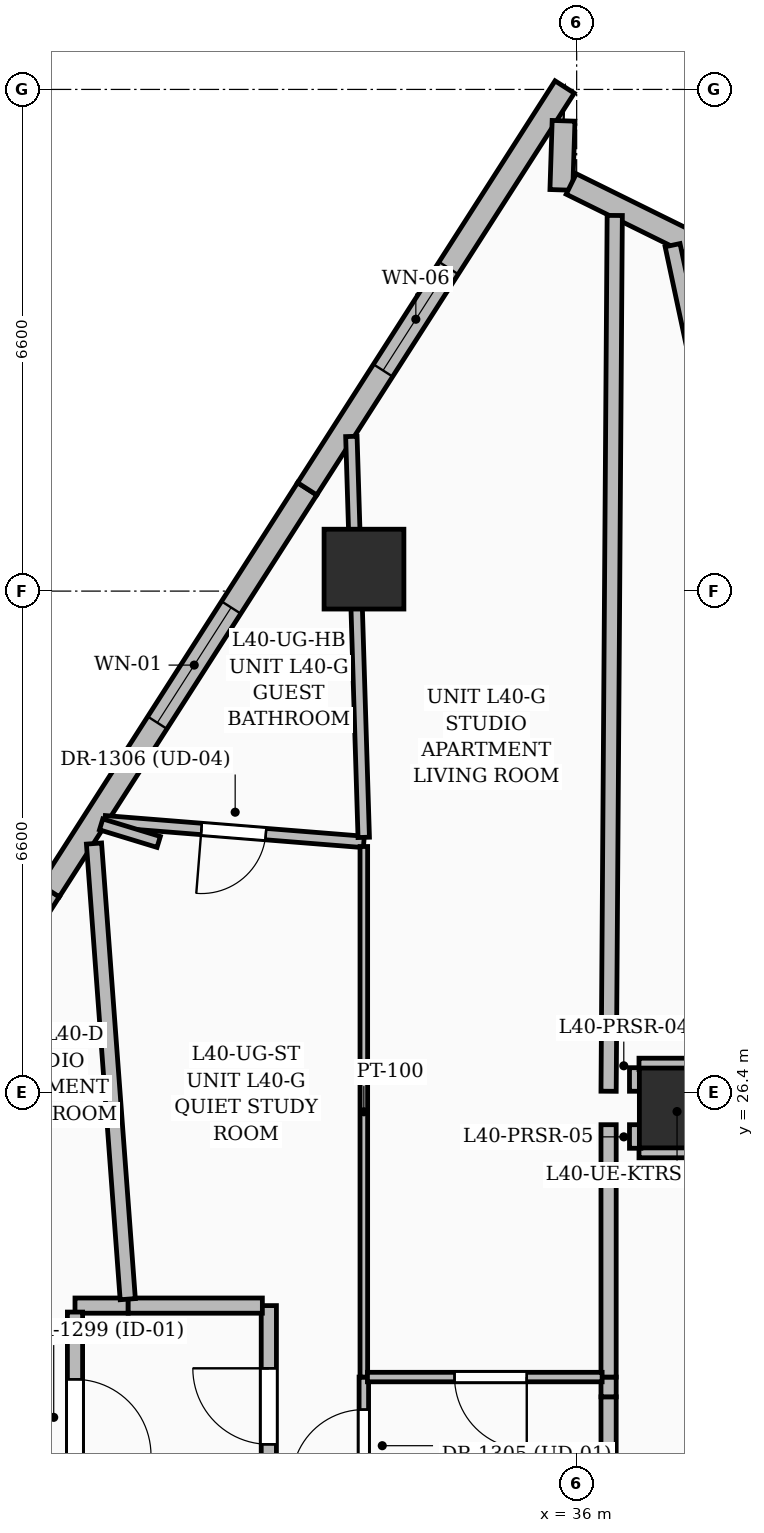
"""IFC4 building model, lengths in metres.
Left out: names, types, materials, properties, quantities, classifications, styles, units other than length and angle.
Written with IfcOpenShell. Run it as: python <this file> out.ifc"""

import sys

from ifc_helpers import new_model, si_unit, direction, frame, frame_2d, origin, origin_2d, place, context, subcontext, project, spatial, rectangle, extrude, element, fill, save


model = new_model("IFC4")
c1 = context("Model", 3, precision=1e-05, world=origin(), true_north=direction((0.0, 1.0)))
c2 = subcontext(c1, "Body", "Model", "MODEL_VIEW")
j1 = project(units=[si_unit("LENGTHUNIT", "METRE"), si_unit("PLANEANGLEUNIT", "RADIAN")], contexts=[c1])
p1 = place(None, origin())
s1 = spatial("IfcSite", under=j1, at=p1, CompositionType="ELEMENT")
p2 = place(p1, origin())
s2 = spatial("IfcBuilding", under=s1, at=p2, CompositionType="ELEMENT")
p3 = place(p2, frame((0.0, 0.0, 157.2)))
s3 = spatial("IfcBuildingStorey", under=s2, at=p3, CompositionType="ELEMENT", Elevation=157.2)
for number, where, z_axis, x_axis in (
    (1, (37.35, 26.2, 0.0), (0.0, 0.0, 1.0), (1.0, 0.0, 0.0)),
    (2, (33.202, 33.289, 0.0), (0.0, 0.0, 1.0), (1.0, 0.0, 0.0)),
):
    element("IfcColumn", number, at=place(p3, frame(where, z_axis=z_axis, x_axis=x_axis)), inside=s3, PredefinedType="COLUMN", context=c2, shape_type="SweptSolid", body=[
        extrude(rectangle(XDim=1.05, YDim=1.05, at=origin_2d()), origin(), (0.0, 0.0, 1.0), 3.6),
    ])
p4 = place(p3, frame((25.679, 23.772, 0.0), z_axis=(0.0, 0.0, 1.0), x_axis=(0.539489448276, 0.841992360535, 0.0)))
e3 = element("IfcWall", 3, at=p4, inside=s3, PredefinedType="SOLIDWALL", context=c2, shape_type="SweptSolid", body=[
    extrude(rectangle(XDim=6.279, YDim=0.3, at=frame_2d((3.14, 0.0))), origin(), (0.0, 0.0, 1.0), 3.35),
])
p5 = place(p4, frame((1.975, 0.0, 0.55)))
e4 = element("IfcOpeningElement", 4, at=p5, cuts=e3, PredefinedType="OPENING", context=c2, shape_type="SweptSolid", body=[
    extrude(rectangle(XDim=2.1, YDim=2.4, at=frame_2d((1.05, 1.2))), frame((0.0, 0.16, 0.0), z_axis=(0.0, -1.0, 0.0), x_axis=(1.0, 0.0, 0.0)), (0.0, 0.0, 1.0), 0.32),
])
p6 = place(p3, frame((29.067, 29.059, 0.0), z_axis=(0.0, 0.0, 1.0), x_axis=(0.539534675603, 0.841963380333, 0.0)))
e5 = element("IfcWall", 5, at=p6, inside=s3, PredefinedType="SOLIDWALL", context=c2, shape_type="SweptSolid", body=[
    extrude(rectangle(XDim=6.279, YDim=0.3, at=frame_2d((3.139, 0.0))), origin(), (0.0, 0.0, 1.0), 3.35),
])
p7 = place(p6, frame((2.625, 0.0, 0.6)))
e6 = element("IfcOpeningElement", 6, at=p7, cuts=e5, PredefinedType="OPENING", context=c2, shape_type="SweptSolid", body=[
    extrude(rectangle(XDim=1.8, YDim=2.1, at=frame_2d((0.9, 1.05))), frame((0.0, 0.16, 0.0), z_axis=(0.0, -1.0, 0.0), x_axis=(1.0, 0.0, 0.0)), (0.0, 0.0, 1.0), 0.32),
])
p8 = place(p3, frame((32.455, 34.345, 0.0), z_axis=(0.0, 0.0, 1.0), x_axis=(0.539489448276, 0.841992360535, 0.0)))
e7 = element("IfcWall", 7, at=p8, inside=s3, PredefinedType="SOLIDWALL", context=c2, shape_type="SweptSolid", body=[
    extrude(rectangle(XDim=6.279, YDim=0.3, at=frame_2d((3.14, 0.0))), origin(), (0.0, 0.0, 1.0), 3.35),
])
p9 = place(p8, frame((1.85, 0.0, 0.55)))
e8 = element("IfcOpeningElement", 8, at=p9, cuts=e7, PredefinedType="OPENING", context=c2, shape_type="SweptSolid", body=[
    extrude(rectangle(XDim=1.6, YDim=2.2, at=frame_2d((0.8, 1.1))), frame((0.0, 0.16, 0.0), z_axis=(0.0, -1.0, 0.0), x_axis=(1.0, 0.0, 0.0)), (0.0, 0.0, 1.0), 0.32),
])
p10 = place(p3, frame((35.828, 39.187, 0.0), z_axis=(0.0, 0.0, 1.0), x_axis=(-0.031938584897, -0.999489833262, 0.0)))
e9 = element("IfcWall", 9, at=p10, inside=s3, PredefinedType="SOLIDWALL", context=c2, shape_type="SweptSolid", body=[
    extrude(rectangle(XDim=0.91, YDim=0.3, at=frame_2d((0.455, 0.0))), origin(), (0.0, 0.0, 1.0), 3.35),
])
p11 = place(p3, frame((35.928, 38.356, 0.0), z_axis=(0.0, 0.0, 1.0), x_axis=(0.896845505116, -0.442343915922, 0.0)))
e10 = element("IfcWall", 10, at=p11, inside=s3, PredefinedType="SOLIDWALL", context=c2, shape_type="SweptSolid", body=[
    extrude(rectangle(XDim=2.249, YDim=0.3, at=frame_2d((1.125, 0.0))), origin(), (0.0, 0.0, 1.0), 3.35),
])
p12 = place(p3, frame((30.1, 23.6, 0.0), z_axis=(0.0, 0.0, 1.0), x_axis=(-1.0, 0.0, 0.0)))
e11 = element("IfcWall", 11, at=p12, inside=s3, PredefinedType="PARTITIONING", context=c2, shape_type="SweptSolid", body=[
    extrude(rectangle(XDim=0.7, YDim=0.2, at=frame_2d((0.35, 0.0))), origin(), (0.0, 0.0, 1.0), 2.393),
])
p13 = place(p3, frame((29.4, 23.515, 0.0), z_axis=(0.0, 0.0, 1.0), x_axis=(0.0, -1.0, 0.0)))
e12 = element("IfcWall", 12, at=p13, inside=s3, PredefinedType="PARTITIONING", context=c2, shape_type="SweptSolid", body=[
    extrude(rectangle(XDim=2.855, YDim=0.2, at=frame_2d((1.427, 0.0))), origin(), (0.0, 0.0, 1.0), 2.393),
])
p14 = place(p13, frame((0.885, 0.0, 0.0)))
e13 = element("IfcOpeningElement", 13, at=p14, cuts=e12, PredefinedType="OPENING", context=c2, shape_type="SweptSolid", body=[
    extrude(rectangle(XDim=1.0, YDim=2.2, at=frame_2d((0.5, 1.1))), frame((0.0, 0.11, 0.0), z_axis=(0.0, -1.0, 0.0), x_axis=(1.0, 0.0, 0.0)), (0.0, 0.0, 1.0), 0.22),
])
p15 = place(p3, frame((31.95, 20.95, 0.0), z_axis=(0.0, 0.0, 1.0), x_axis=(0.0, 1.0, 0.0)))
e14 = element("IfcWall", 14, at=p15, inside=s3, PredefinedType="PARTITIONING", context=c2, shape_type="SweptSolid", body=[
    extrude(rectangle(XDim=2.65, YDim=0.2, at=frame_2d((1.325, 0.0))), origin(), (0.0, 0.0, 1.0), 2.393),
])
p16 = place(p15, frame((0.825, 0.0, 0.0)))
e15 = element("IfcOpeningElement", 15, at=p16, cuts=e14, PredefinedType="OPENING", context=c2, shape_type="SweptSolid", body=[
    extrude(rectangle(XDim=1.0, YDim=2.2, at=frame_2d((0.5, 1.1))), frame((0.0, 0.11, 0.0), z_axis=(0.0, -1.0, 0.0), x_axis=(1.0, 0.0, 0.0)), (0.0, 0.0, 1.0), 0.22),
])
p17 = place(p3, frame((31.865, 23.6, 0.0), z_axis=(0.0, 0.0, 1.0), x_axis=(-1.0, 0.0, 0.0)))
e16 = element("IfcWall", 16, at=p17, inside=s3, PredefinedType="PARTITIONING", context=c2, shape_type="SweptSolid", body=[
    extrude(rectangle(XDim=1.765, YDim=0.2, at=frame_2d((0.882, 0.0))), origin(), (0.0, 0.0, 1.0), 3.01),
])
p18 = place(p3, frame((30.094, 23.685, 0.0), z_axis=(0.0, 0.0, 1.0), x_axis=(-0.073885151141, 0.997266756912, 0.0)))
e17 = element("IfcWall", 17, at=p18, inside=s3, PredefinedType="PARTITIONING", context=c2, shape_type="SweptSolid", body=[
    extrude(rectangle(XDim=6.01, YDim=0.2, at=frame_2d((3.005, 0.0))), origin(), (0.0, 0.0, 1.0), 2.57),
])
p19 = place(p3, frame((36.42, 22.4, 0.0), z_axis=(0.0, 0.0, 1.0), x_axis=(0.0, -1.0, 0.0)))
e18 = element("IfcWall", 18, at=p19, inside=s3, PredefinedType="PARTITIONING", context=c2, shape_type="SweptSolid", body=[
    extrude(rectangle(XDim=4.565, YDim=0.2, at=frame_2d((2.282, 0.0))), origin(), (0.0, 0.0, 1.0), 3.35),
])
p20 = place(p3, frame((36.42, 22.66, 0.0), z_axis=(0.0, 0.0, 1.0), x_axis=(0.0, -1.0, 0.0)))
e19 = element("IfcWall", 19, at=p20, inside=s3, PredefinedType="PARTITIONING", context=c2, shape_type="SweptSolid", body=[
    extrude(rectangle(XDim=0.26, YDim=0.2, at=frame_2d((0.13, 0.0))), origin(), (0.0, 0.0, 1.0), 3.35),
])
p21 = place(p3, frame((36.42, 25.98, 0.0), z_axis=(0.0, 0.0, 1.0), x_axis=(0.0, -1.0, 0.0)))
e20 = element("IfcWall", 20, at=p21, inside=s3, PredefinedType="PARTITIONING", context=c2, shape_type="SweptSolid", body=[
    extrude(rectangle(XDim=3.32, YDim=0.2, at=frame_2d((1.66, 0.0))), origin(), (0.0, 0.0, 1.0), 2.436),
])
p22 = place(p3, frame((36.501, 37.942, 0.0), z_axis=(0.0, 0.0, 1.0), x_axis=(-0.007034618495, -0.999975256765, 0.0)))
e21 = element("IfcWall", 21, at=p22, inside=s3, PredefinedType="PARTITIONING", context=c2, shape_type="SweptSolid", body=[
    extrude(rectangle(XDim=11.522, YDim=0.2, at=frame_2d((5.761, 0.0))), origin(), (0.0, 0.0, 1.0), 2.393),
])
p23 = place(p3, frame((38.83, 30.21, 0.0), z_axis=(0.0, 0.0, 1.0), x_axis=(-0.208896033751, 0.977937854407, 0.0)))
e22 = element("IfcWall", 22, at=p23, inside=s3, PredefinedType="PARTITIONING", context=c2, shape_type="SweptSolid", body=[
    extrude(rectangle(XDim=7.507, YDim=0.2, at=frame_2d((3.753, 0.0))), origin(), (0.0, 0.0, 1.0), 2.57),
])
p24 = place(p3, frame((33.2, 29.7, 0.0), z_axis=(0.0, 0.0, 1.0), x_axis=(-0.996817095408, 0.079722508132, 0.0)))
e23 = element("IfcWall", 23, at=p24, inside=s3, PredefinedType="PARTITIONING", context=c2, shape_type="SweptSolid", body=[
    extrude(rectangle(XDim=3.418, YDim=0.15, at=frame_2d((1.709, 0.0))), origin(), (0.0, 0.0, 1.0), 2.57),
])
p25 = place(p24, frame((1.293, 0.0, 0.0)))
e24 = element("IfcOpeningElement", 24, at=p25, cuts=e23, PredefinedType="OPENING", context=c2, shape_type="SweptSolid", body=[
    extrude(rectangle(XDim=0.85, YDim=2.1, at=frame_2d((0.425, 1.05))), frame((0.0, 0.085, 0.0), z_axis=(0.0, -1.0, 0.0), x_axis=(1.0, 0.0, 0.0)), (0.0, 0.0, 1.0), 0.17),
])
p26 = place(p3, frame((33.2, 20.998, 0.0), z_axis=(0.0, 0.0, 1.0), x_axis=(0.0, 1.0, 0.0)))
e25 = element("IfcWall", 25, at=p26, inside=s3, PredefinedType="PARTITIONING", context=c2, shape_type="SweptSolid", body=[
    extrude(rectangle(XDim=1.662, YDim=0.125, at=frame_2d((0.831, 0.0))), origin(), (0.0, 0.0, 1.0), 3.35),
])
p27 = place(p26, frame((0.284, 0.0, 0.0)))
e26 = element("IfcOpeningElement", 26, at=p27, cuts=e25, PredefinedType="OPENING", context=c2, shape_type="SweptSolid", body=[
    extrude(rectangle(XDim=0.95, YDim=2.2, at=frame_2d((0.475, 1.1))), frame((0.0, 0.072, 0.0), z_axis=(0.0, -1.0, 0.0), x_axis=(1.0, 0.0, 0.0)), (0.0, 0.0, 1.0), 0.145),
])
p28 = place(p3, frame((33.2, 22.66, 0.0), z_axis=(0.0, 0.0, 1.0), x_axis=(0.0, 1.0, 0.0)))
e27 = element("IfcWall", 27, at=p28, inside=s3, PredefinedType="PARTITIONING", context=c2, shape_type="SweptSolid", body=[
    extrude(rectangle(XDim=6.98, YDim=0.1, at=frame_2d((3.49, 0.0))), origin(), (0.0, 0.0, 1.0), 3.01),
])
p29 = place(p3, frame((33.199, 29.76, 0.0), z_axis=(0.0, 0.0, 1.0), x_axis=(-0.030856354446, 0.999523829326, 0.0)))
e28 = element("IfcWall", 28, at=p29, inside=s3, PredefinedType="PARTITIONING", context=c2, shape_type="SweptSolid", body=[
    extrude(rectangle(XDim=5.277, YDim=0.15, at=frame_2d((2.639, 0.0))), origin(), (0.0, 0.0, 1.0), 2.57),
])
p30 = place(p3, frame((36.335, 22.66, 0.0), z_axis=(0.0, 0.0, 1.0), x_axis=(-1.0, 0.0, 0.0)))
e29 = element("IfcWall", 29, at=p30, inside=s3, PredefinedType="PARTITIONING", context=c2, shape_type="SweptSolid", body=[
    extrude(rectangle(XDim=3.087, YDim=0.125, at=frame_2d((1.544, 0.0))), origin(), (0.0, 0.0, 1.0), 2.436),
])
p31 = place(p30, frame((0.991, 0.0, 0.0)))
e30 = element("IfcOpeningElement", 30, at=p31, cuts=e29, PredefinedType="OPENING", context=c2, shape_type="SweptSolid", body=[
    extrude(rectangle(XDim=0.95, YDim=2.2, at=frame_2d((0.475, 1.1))), frame((0.0, 0.072, 0.0), z_axis=(0.0, -1.0, 0.0), x_axis=(1.0, 0.0, 0.0)), (0.0, 0.0, 1.0), 0.145),
])
p32 = place(p3, frame((29.744, 29.931, 0.0), z_axis=(0.0, 0.0, 1.0), x_axis=(0.956483166449, -0.291787512241, 0.0)))
e31 = element("IfcWall", 31, at=p32, inside=s3, PredefinedType="PARTITIONING", context=c2, shape_type="SweptSolid", body=[
    extrude(rectangle(XDim=0.792, YDim=0.15, at=frame_2d((0.396, 0.0))), origin(), (0.0, 0.0, 1.0), 3.35),
])
p33 = place(p3, frame((36.77, 26.42, 0.0), z_axis=(0.0, 0.0, 1.0), x_axis=(0.0, 1.0, 0.0)))
e32 = element("IfcWall", 32, at=p33, inside=s3, PredefinedType="PARTITIONING", context=c2, shape_type="SweptSolid", body=[
    extrude(rectangle(XDim=0.31, YDim=0.15, at=frame_2d((0.155, 0.0))), origin(), (0.0, 0.0, 1.0), 2.393),
])
p34 = place(p3, frame((36.82, 26.78, 0.0), z_axis=(0.0, 0.0, 1.0), x_axis=(1.0, 0.0, 0.0)))
e33 = element("IfcWall", 33, at=p34, inside=s3, PredefinedType="PARTITIONING", context=c2, shape_type="SweptSolid", body=[
    extrude(rectangle(XDim=1.07, YDim=0.15, at=frame_2d((0.535, 0.0))), origin(), (0.0, 0.0, 1.0), 2.393),
])
p35 = place(p3, frame((37.89, 25.62, 0.0), z_axis=(0.0, 0.0, 1.0), x_axis=(-1.0, 0.0, 0.0)))
e34 = element("IfcWall", 34, at=p35, inside=s3, PredefinedType="PARTITIONING", context=c2, shape_type="SweptSolid", body=[
    extrude(rectangle(XDim=1.07, YDim=0.15, at=frame_2d((0.535, 0.0))), origin(), (0.0, 0.0, 1.0), 2.436),
])
p36 = place(p3, frame((36.77, 25.67, 0.0), z_axis=(0.0, 0.0, 1.0), x_axis=(0.0, 1.0, 0.0)))
e35 = element("IfcWall", 35, at=p36, inside=s3, PredefinedType="PARTITIONING", context=c2, shape_type="SweptSolid", body=[
    extrude(rectangle(XDim=0.31, YDim=0.15, at=frame_2d((0.155, 0.0))), origin(), (0.0, 0.0, 1.0), 3.35),
])
p37 = place(p7, origin())
e36 = element("IfcWindow", 36, at=p37, inside=s3, PartitioningType="SINGLE_PANEL", PredefinedType="WINDOW", context=c2, shape_type="SweptSolid", body=[
    extrude(rectangle(XDim=1.8, YDim=2.1, at=frame_2d((0.9, 1.05))), frame((0.0, 0.03, 0.0), z_axis=(0.0, -1.0, 0.0), x_axis=(1.0, 0.0, 0.0)), (0.0, 0.0, 1.0), 0.06),
])
fill(e6, e36)
p38 = place(p9, origin())
e37 = element("IfcWindow", 37, at=p38, inside=s3, PartitioningType="SINGLE_PANEL", PredefinedType="WINDOW", context=c2, shape_type="SweptSolid", body=[
    extrude(rectangle(XDim=1.6, YDim=2.2, at=frame_2d((0.8, 1.1))), frame((0.0, 0.03, 0.0), z_axis=(0.0, -1.0, 0.0), x_axis=(1.0, 0.0, 0.0)), (0.0, 0.0, 1.0), 0.06),
])
fill(e8, e37)
p39 = place(p14, origin())
e38 = element("IfcDoor", 38, at=p39, inside=s3, OperationType="SINGLE_SWING_RIGHT", PredefinedType="DOOR", context=c2, shape_type="SweptSolid", body=[
    extrude(rectangle(XDim=1.0, YDim=2.2, at=frame_2d((0.5, 1.1))), frame((0.0, 0.025, 0.0), z_axis=(0.0, -1.0, 0.0), x_axis=(1.0, 0.0, 0.0)), (0.0, 0.0, 1.0), 0.05),
])
fill(e13, e38)
p40 = place(p16, origin())
e39 = element("IfcDoor", 39, at=p40, inside=s3, OperationType="SINGLE_SWING_RIGHT", PredefinedType="DOOR", context=c2, shape_type="SweptSolid", body=[
    extrude(rectangle(XDim=1.0, YDim=2.2, at=frame_2d((0.5, 1.1))), frame((0.0, 0.025, 0.0), z_axis=(0.0, -1.0, 0.0), x_axis=(1.0, 0.0, 0.0)), (0.0, 0.0, 1.0), 0.05),
])
fill(e15, e39)
p41 = place(p27, origin())
e40 = element("IfcDoor", 40, at=p41, inside=s3, OperationType="SINGLE_SWING_LEFT", PredefinedType="DOOR", context=c2, shape_type="SweptSolid", body=[
    extrude(rectangle(XDim=0.95, YDim=2.2, at=frame_2d((0.475, 1.1))), frame((0.0, 0.025, 0.0), z_axis=(0.0, -1.0, 0.0), x_axis=(1.0, 0.0, 0.0)), (0.0, 0.0, 1.0), 0.05),
])
fill(e26, e40)
p42 = place(p25, origin())
e41 = element("IfcDoor", 41, at=p42, inside=s3, OperationType="SINGLE_SWING_RIGHT", PredefinedType="DOOR", context=c2, shape_type="SweptSolid", body=[
    extrude(rectangle(XDim=0.85, YDim=2.1, at=frame_2d((0.425, 1.05))), frame((0.0, 0.025, 0.0), z_axis=(0.0, -1.0, 0.0), x_axis=(1.0, 0.0, 0.0)), (0.0, 0.0, 1.0), 0.05),
])
fill(e24, e41)
p43 = place(p31, origin())
e42 = element("IfcDoor", 42, at=p43, inside=s3, OperationType="SINGLE_SWING_LEFT", PredefinedType="DOOR", context=c2, shape_type="SweptSolid", body=[
    extrude(rectangle(XDim=0.95, YDim=2.2, at=frame_2d((0.475, 1.1))), frame((0.0, 0.025, 0.0), z_axis=(0.0, -1.0, 0.0), x_axis=(1.0, 0.0, 0.0)), (0.0, 0.0, 1.0), 0.05),
])
fill(e30, e42)
save(model, sys.argv[1])
